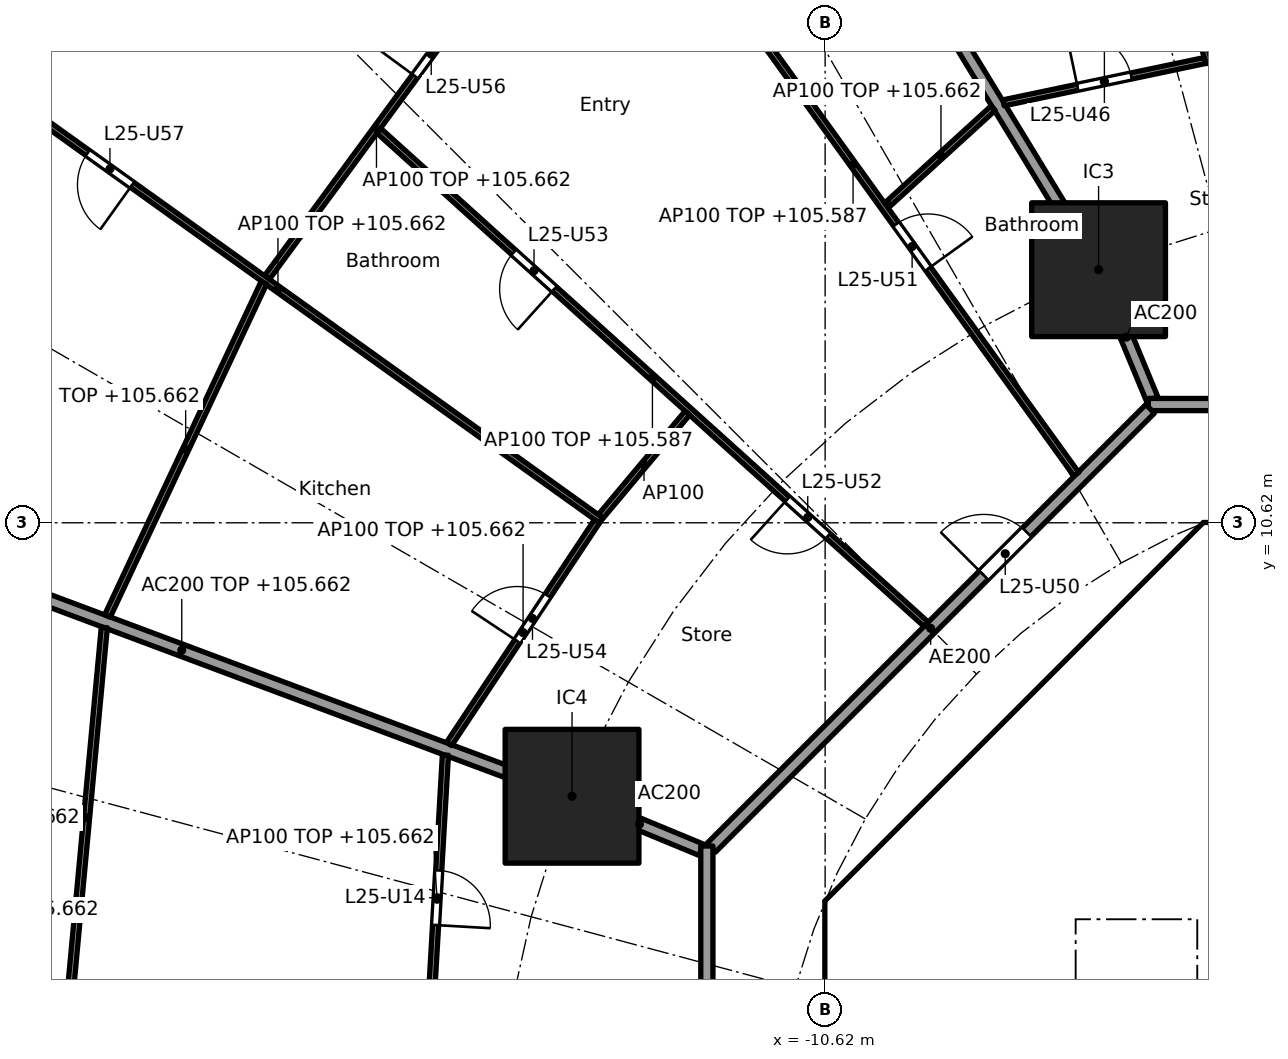
"""IFC4 building model, lengths in metres.
Left out: names, types, materials, properties, quantities, classifications, styles, units other than length and angle.
Written with IfcOpenShell. Run it as: python <this file> out.ifc"""

import sys

from ifc_helpers import new_model, si_unit, direction, frame, frame_2d, origin, origin_2d, place, context, subcontext, project, spatial, polyline, rectangle, outline, extrude, element, fill, save


model = new_model("IFC4")
c1 = context("Model", 3, precision=1e-05, world=origin(), true_north=direction((0.0, 1.0)))
c2 = subcontext(c1, "Body", "Model", "MODEL_VIEW")
j1 = project(units=[si_unit("LENGTHUNIT", "METRE"), si_unit("PLANEANGLEUNIT", "RADIAN")], contexts=[c1])
p1 = place(None, origin())
s1 = spatial("IfcSite", under=j1, at=p1, CompositionType="ELEMENT")
p2 = place(p1, origin())
s2 = spatial("IfcBuilding", under=s1, at=p2, CompositionType="ELEMENT")
p3 = place(p2, frame((0.0, 0.0, 102.9)))
s3 = spatial("IfcBuildingStorey", under=s2, at=p3, CompositionType="ELEMENT", Elevation=102.9)
for number, where, z_axis, x_axis in (
    (1, (-6.123, 14.782, 0.0), (0.0, 0.0, 1.0), (1.0, 0.0, 0.0)),
    (2, (-14.782, 6.123, 0.0), (0.0, 0.0, 1.0), (1.0, 0.0, 0.0)),
):
    element("IfcColumn", number, at=place(p3, frame(where, z_axis=z_axis, x_axis=x_axis)), inside=s3, PredefinedType="COLUMN", context=c2, shape_type="SweptSolid", body=[
        extrude(rectangle(XDim=2.2, YDim=2.2, at=origin_2d()), origin(), (0.0, 0.0, 1.0), 3.7),
    ])
p4 = place(p3, frame((-4.613, 9.988, 0.0), z_axis=(0.0, 0.0, 1.0), x_axis=(-0.707106781187, -0.707106781187, 0.0)))
e3 = element("IfcWall", 3, at=p4, inside=s3, PredefinedType="SHEAR", context=c2, shape_type="SweptSolid", body=[
    extrude(rectangle(XDim=7.602, YDim=0.6, at=frame_2d((3.801, 0.0))), origin(), (0.0, 0.0, 1.0), 3.44),
])
p5 = place(p4, frame((0.351, 0.0, 0.0)))
e4 = element("IfcOpeningElement", 4, at=p5, cuts=e3, PredefinedType="OPENING", context=c2, shape_type="SweptSolid", body=[
    extrude(rectangle(XDim=1.1, YDim=2.1, at=frame_2d((0.55, 1.05))), frame((0.0, 0.31, 0.0), z_axis=(0.0, -1.0, 0.0), x_axis=(1.0, 0.0, 0.0)), (0.0, 0.0, 1.0), 0.62),
])
p6 = place(p3, frame((-10.325, 3.801, 0.0), z_axis=(0.0, 0.0, 1.0), x_axis=(0.0, -1.0, 0.0)))
e5 = element("IfcWall", 5, at=p6, inside=s3, PredefinedType="SHEAR", context=c2, shape_type="SweptSolid", body=[
    extrude(rectangle(XDim=7.602, YDim=0.6, at=frame_2d((3.801, 0.0))), origin(), (0.0, 0.0, 1.0), 3.44),
])
p7 = place(p6, frame((0.651, 0.0, 0.0)))
e6 = element("IfcOpeningElement", 6, at=p7, cuts=e5, PredefinedType="OPENING", context=c2, shape_type="SweptSolid", body=[
    extrude(rectangle(XDim=1.5, YDim=2.1, at=frame_2d((0.75, 1.05))), frame((0.0, 0.31, 0.0), z_axis=(0.0, -1.0, 0.0), x_axis=(1.0, 0.0, 0.0)), (0.0, 0.0, 1.0), 0.62),
])
p8 = place(p6, frame((5.451, 0.0, 0.0)))
e7 = element("IfcOpeningElement", 7, at=p8, cuts=e5, PredefinedType="OPENING", context=c2, shape_type="SweptSolid", body=[
    extrude(rectangle(XDim=1.5, YDim=2.1, at=frame_2d((0.75, 1.05))), frame((0.0, 0.31, 0.0), z_axis=(0.0, -1.0, 0.0), x_axis=(1.0, 0.0, 0.0)), (0.0, 0.0, 1.0), 0.62),
])
p9 = place(p3, frame((-5.8, 4.3, 0.0), z_axis=(0.0, 0.0, 1.0), x_axis=(0.0, 1.0, 0.0)))
e8 = element("IfcWall", 8, at=p9, inside=s3, PredefinedType="PARTITIONING", context=c2, shape_type="SweptSolid", body=[
    extrude(rectangle(XDim=3.927, YDim=0.15, at=frame_2d((1.963, 0.0))), origin(), (0.0, 0.0, 1.0), 3.44),
])
p10 = place(p9, frame((0.413, 0.0, 0.0)))
e9 = element("IfcOpeningElement", 9, at=p10, cuts=e8, PredefinedType="OPENING", context=c2, shape_type="SweptSolid", body=[
    extrude(rectangle(XDim=0.9, YDim=2.1, at=frame_2d((0.45, 1.05))), frame((0.0, 0.085, 0.0), z_axis=(0.0, -1.0, 0.0), x_axis=(1.0, 0.0, 0.0)), (0.0, 0.0, 1.0), 0.17),
])
p11 = place(p9, frame((2.489, 0.0, 0.0)))
e10 = element("IfcOpeningElement", 10, at=p11, cuts=e8, PredefinedType="OPENING", context=c2, shape_type="SweptSolid", body=[
    extrude(rectangle(XDim=0.9, YDim=2.1, at=frame_2d((0.45, 1.05))), frame((0.0, 0.085, 0.0), z_axis=(0.0, -1.0, 0.0), x_axis=(1.0, 0.0, 0.0)), (0.0, 0.0, 1.0), 0.17),
])
p12 = place(p3, origin())
e11 = element("IfcWall", 11, at=p12, inside=s3, PredefinedType="SHEAR", context=c2, shape_type="SweptSolid", body=[
    extrude(outline(polyline([(-10.2, 4.825), (-9.776, 4.401), (-10.025, 4.152), (-10.025, 3.801), (-10.625, 3.801), (-10.625, 4.401), (-10.2, 4.825)])), origin(), (0.0, 0.0, 1.0), 3.44),
])
p13 = place(p3, origin())
e12 = element("IfcWall", 12, at=p13, inside=s3, PredefinedType="SHEAR", context=c2, shape_type="SweptSolid", body=[
    extrude(outline(polyline([(-4.152, 10.025), (-4.401, 9.776), (-4.825, 10.2), (-4.401, 10.625), (4.401, 10.625), (4.825, 10.2), (4.401, 9.776), (4.152, 10.025), (-4.152, 10.025)])), origin(), (0.0, 0.0, 1.0), 3.44),
])
p14 = place(p3, frame((-10.025, 4.0, 0.0), z_axis=(0.0, 0.0, 1.0), x_axis=(1.0, 0.0, 0.0)))
e13 = element("IfcWall", 13, at=p14, inside=s3, PredefinedType="PARTITIONING", context=c2, shape_type="SweptSolid", body=[
    extrude(rectangle(XDim=3.325, YDim=0.2, at=frame_2d((1.662, 0.0))), origin(), (0.0, 0.0, 1.0), 3.44),
])
p15 = place(p3, frame((-8.001, 6.1, 0.0), z_axis=(0.0, 0.0, 1.0), x_axis=(1.0, 0.0, 0.0)))
e14 = element("IfcWall", 14, at=p15, inside=s3, PredefinedType="PARTITIONING", context=c2, shape_type="SweptSolid", body=[
    extrude(rectangle(XDim=2.126, YDim=0.15, at=frame_2d((1.063, 0.0))), origin(), (0.0, 0.0, 1.0), 3.44),
])
p16 = place(p3, origin())
e15 = element("IfcWall", 15, at=p16, inside=s3, PredefinedType="SOLIDWALL", context=c2, shape_type="SweptSolid", body=[
    extrude(outline(polyline([(-6.5, 2.1), (-6.7, 2.1), (-6.7, 4.3), (6.7, 4.3), (6.7, 2.1), (6.5, 2.1), (6.5, 4.1), (4.5, 4.1), (4.5, 2.1), (4.3, 2.1), (4.3, 4.1), (2.3, 4.1), (2.3, 2.1), (2.1, 2.1), (2.1, 4.1), (0.1, 4.1), (0.1, 2.1), (-0.1, 2.1), (-0.1, 4.1), (-2.1, 4.1), (-2.1, 2.1), (-2.3, 2.1), (-2.3, 4.1), (-4.3, 4.1), (-4.3, 2.1), (-4.5, 2.1), (-4.5, 4.1), (-6.5, 4.1), (-6.5, 2.1)])), origin(), (0.0, 0.0, 1.0), 3.44),
])
p17 = place(p3, frame((-5.243, 12.657, 0.0), z_axis=(0.0, 0.0, 1.0), x_axis=(-0.38273085373, 0.923859888513, 0.0)))
e16 = element("IfcWall", 16, at=p17, inside=s3, PredefinedType="PARTITIONING", context=c2, shape_type="SweptSolid", body=[
    extrude(rectangle(XDim=2.199, YDim=0.2, at=frame_2d((1.1, 0.0))), origin(), (0.0, 0.0, 1.0), 3.44),
])
p18 = place(p3, frame((-6.149, 14.825, 0.0), z_axis=(0.0, 0.0, 1.0), x_axis=(-0.520412862249, 0.853914780763, 0.0)))
e17 = element("IfcWall", 17, at=p18, inside=s3, PredefinedType="PARTITIONING", context=c2, shape_type="SweptSolid", body=[
    extrude(rectangle(XDim=17.202, YDim=0.2, at=frame_2d((8.601, 0.0))), origin(), (0.0, 0.0, 1.0), 2.762),
])
p19 = place(p3, frame((-12.657, 5.243, 0.0), z_axis=(0.0, 0.0, 1.0), x_axis=(-0.923843626288, 0.382770106157, 0.0)))
e18 = element("IfcWall", 18, at=p19, inside=s3, PredefinedType="PARTITIONING", context=c2, shape_type="SweptSolid", body=[
    extrude(rectangle(XDim=2.199, YDim=0.2, at=frame_2d((1.1, 0.0))), origin(), (0.0, 0.0, 1.0), 3.44),
])
p20 = place(p3, frame((-14.829, 6.14, 0.0), z_axis=(0.0, 0.0, 1.0), x_axis=(-0.936597324342, 0.35040755134, 0.0)))
e19 = element("IfcWall", 19, at=p20, inside=s3, PredefinedType="PARTITIONING", context=c2, shape_type="SweptSolid", body=[
    extrude(rectangle(XDim=13.606, YDim=0.2, at=frame_2d((6.803, 0.0))), origin(), (0.0, 0.0, 1.0), 2.762),
])
p21 = place(p3, frame((5.104, 12.565, 0.0), z_axis=(0.0, 0.0, 1.0), x_axis=(-1.0, 0.0, 0.0)))
e20 = element("IfcWall", 20, at=p21, inside=s3, PredefinedType="PARTITIONING", context=c2, shape_type="SweptSolid", body=[
    extrude(rectangle(XDim=10.409, YDim=0.2, at=frame_2d((5.205, 0.0))), origin(), (0.0, 0.0, 1.0), 3.44),
])
p22 = place(p21, frame((4.604, 0.0, 0.0)))
e21 = element("IfcOpeningElement", 21, at=p22, cuts=e20, PredefinedType="OPENING", context=c2, shape_type="SweptSolid", body=[
    extrude(rectangle(XDim=1.0, YDim=2.1, at=frame_2d((0.5, 1.05))), frame((0.0, 0.11, 0.0), z_axis=(0.0, -1.0, 0.0), x_axis=(1.0, 0.0, 0.0)), (0.0, 0.0, 1.0), 0.22),
])
p23 = place(p3, frame((-5.275, 12.494, 0.0), z_axis=(0.0, 0.0, 1.0), x_axis=(-0.707106781187, -0.707106781187, 0.0)))
e22 = element("IfcWall", 22, at=p23, inside=s3, PredefinedType="PARTITIONING", context=c2, shape_type="SweptSolid", body=[
    extrude(rectangle(XDim=10.209, YDim=0.2, at=frame_2d((5.104, 0.0))), origin(), (0.0, 0.0, 1.0), 3.44),
])
p24 = place(p23, frame((2.87, 0.0, 0.0)))
e23 = element("IfcOpeningElement", 23, at=p24, cuts=e22, PredefinedType="OPENING", context=c2, shape_type="SweptSolid", body=[
    extrude(rectangle(XDim=1.0, YDim=2.1, at=frame_2d((0.5, 1.05))), frame((0.0, 0.11, 0.0), z_axis=(0.0, -1.0, 0.0), x_axis=(1.0, 0.0, 0.0)), (0.0, 0.0, 1.0), 0.22),
])
p25 = place(p3, frame((-12.565, 5.304, 0.0), z_axis=(0.0, 0.0, 1.0), x_axis=(0.0, -1.0, 0.0)))
e24 = element("IfcWall", 24, at=p25, inside=s3, PredefinedType="PARTITIONING", context=c2, shape_type="SweptSolid", body=[
    extrude(rectangle(XDim=10.409, YDim=0.2, at=frame_2d((5.205, 0.0))), origin(), (0.0, 0.0, 1.0), 3.44),
])
p26 = place(p3, frame((-4.306, 18.185, 0.0), z_axis=(0.0, 0.0, 1.0), x_axis=(-0.290183838394, 0.956970919064, 0.0)))
e25 = element("IfcWall", 25, at=p26, inside=s3, PredefinedType="PARTITIONING", context=c2, shape_type="SweptSolid", body=[
    extrude(rectangle(XDim=15.015, YDim=0.1, at=frame_2d((7.508, 0.0))), origin(), (0.0, 0.0, 1.0), 2.762),
])
p27 = place(p26, frame((10.922, 0.0, 0.0)))
e26 = element("IfcOpeningElement", 26, at=p27, cuts=e25, PredefinedType="OPENING", context=c2, shape_type="SweptSolid", body=[
    extrude(rectangle(XDim=0.9, YDim=2.1, at=frame_2d((0.45, 1.05))), frame((0.0, 0.06, 0.0), z_axis=(0.0, -1.0, 0.0), x_axis=(1.0, 0.0, 0.0)), (0.0, 0.0, 1.0), 0.12),
])
p28 = place(p3, frame((-4.37, 18.223, 0.0), z_axis=(0.0, 0.0, 1.0), x_axis=(-0.978633053291, -0.205614559323, 0.0)))
e27 = element("IfcWall", 27, at=p28, inside=s3, PredefinedType="PARTITIONING", context=c2, shape_type="SweptSolid", body=[
    extrude(rectangle(XDim=3.387, YDim=0.1, at=frame_2d((1.694, 0.0))), origin(), (0.0, 0.0, 1.0), 2.762),
])
p29 = place(p28, frame((1.244, 0.0, 0.0)))
e28 = element("IfcOpeningElement", 28, at=p29, cuts=e27, PredefinedType="OPENING", context=c2, shape_type="SweptSolid", body=[
    extrude(rectangle(XDim=0.9, YDim=2.1, at=frame_2d((0.45, 1.05))), frame((0.0, 0.06, 0.0), z_axis=(0.0, -1.0, 0.0), x_axis=(1.0, 0.0, 0.0)), (0.0, 0.0, 1.0), 0.12),
])
p30 = place(p3, frame((-7.857, 17.438, 0.0), z_axis=(0.0, 0.0, 1.0), x_axis=(-0.738883513135, -0.673833179665, 0.0)))
e29 = element("IfcWall", 29, at=p30, inside=s3, PredefinedType="PARTITIONING", context=c2, shape_type="SweptSolid", body=[
    extrude(rectangle(XDim=2.323, YDim=0.1, at=frame_2d((1.162, 0.0))), origin(), (0.0, 0.0, 1.0), 2.762),
])
p31 = place(p3, frame((-6.49, 11.419, 0.0), z_axis=(0.0, 0.0, 1.0), x_axis=(-0.584832823883, 0.811153849839, 0.0)))
e30 = element("IfcWall", 30, at=p31, inside=s3, PredefinedType="PARTITIONING", context=c2, shape_type="SweptSolid", body=[
    extrude(rectangle(XDim=12.553, YDim=0.1, at=frame_2d((6.277, 0.0))), origin(), (0.0, 0.0, 1.0), 2.687),
])
p32 = place(p31, frame((4.166, 0.0, 0.0)))
e31 = element("IfcOpeningElement", 31, at=p32, cuts=e30, PredefinedType="OPENING", context=c2, shape_type="SweptSolid", body=[
    extrude(rectangle(XDim=0.9, YDim=2.1, at=frame_2d((0.45, 1.05))), frame((0.0, 0.06, 0.0), z_axis=(0.0, -1.0, 0.0), x_axis=(1.0, 0.0, 0.0)), (0.0, 0.0, 1.0), 0.12),
])
p33 = place(p3, frame((-16.197, 19.551, 0.0), z_axis=(0.0, 0.0, 1.0), x_axis=(-0.592391983588, -0.80564988536, 0.0)))
e32 = element("IfcWall", 32, at=p33, inside=s3, PredefinedType="PARTITIONING", context=c2, shape_type="SweptSolid", body=[
    extrude(rectangle(XDim=6.08, YDim=0.1, at=frame_2d((3.04, 0.0))), origin(), (0.0, 0.0, 1.0), 2.762),
])
p34 = place(p33, frame((1.07, 0.0, 0.0)))
e33 = element("IfcOpeningElement", 33, at=p34, cuts=e32, PredefinedType="OPENING", context=c2, shape_type="SweptSolid", body=[
    extrude(rectangle(XDim=0.9, YDim=2.1, at=frame_2d((0.45, 1.05))), frame((0.0, 0.06, 0.0), z_axis=(0.0, -1.0, 0.0), x_axis=(1.0, 0.0, 0.0)), (0.0, 0.0, 1.0), 0.12),
])
p35 = place(p3, frame((-8.959, 8.952, 0.0), z_axis=(0.0, 0.0, 1.0), x_axis=(-0.742679904999, 0.669646592398, 0.0)))
e34 = element("IfcWall", 34, at=p35, inside=s3, PredefinedType="PARTITIONING", context=c2, shape_type="SweptSolid", body=[
    extrude(rectangle(XDim=12.121, YDim=0.1, at=frame_2d((6.061, 0.0))), origin(), (0.0, 0.0, 1.0), 2.687),
])
p36 = place(p35, frame((2.172, 0.0, 0.0)))
e35 = element("IfcOpeningElement", 35, at=p36, cuts=e34, PredefinedType="OPENING", context=c2, shape_type="SweptSolid", body=[
    extrude(rectangle(XDim=0.9, YDim=2.1, at=frame_2d((0.45, 1.05))), frame((0.0, 0.06, 0.0), z_axis=(0.0, -1.0, 0.0), x_axis=(1.0, 0.0, 0.0)), (0.0, 0.0, 1.0), 0.12),
])
p37 = place(p35, frame((8.233, 0.0, 0.0)))
e36 = element("IfcOpeningElement", 36, at=p37, cuts=e34, PredefinedType="OPENING", context=c2, shape_type="SweptSolid", body=[
    extrude(rectangle(XDim=0.9, YDim=2.1, at=frame_2d((0.45, 1.05))), frame((0.0, 0.06, 0.0), z_axis=(0.0, -1.0, 0.0), x_axis=(1.0, 0.0, 0.0)), (0.0, 0.0, 1.0), 0.12),
])
p38 = place(p3, frame((-12.885, 12.425, 0.0), z_axis=(0.0, 0.0, 1.0), x_axis=(-0.642551826067, -0.766242227248, 0.0)))
e37 = element("IfcWall", 37, at=p38, inside=s3, PredefinedType="PARTITIONING", context=c2, shape_type="SweptSolid", body=[
    extrude(rectangle(XDim=2.219, YDim=0.1, at=frame_2d((1.109, 0.0))), origin(), (0.0, 0.0, 1.0), 3.44),
])
p39 = place(p3, frame((-14.302, 10.657, 0.0), z_axis=(0.0, 0.0, 1.0), x_axis=(-0.813183002698, 0.582008079087, 0.0)))
e38 = element("IfcWall", 38, at=p39, inside=s3, PredefinedType="PARTITIONING", context=c2, shape_type="SweptSolid", body=[
    extrude(rectangle(XDim=13.074, YDim=0.1, at=frame_2d((6.537, 0.0))), origin(), (0.0, 0.0, 1.0), 2.762),
])
p40 = place(p39, frame((9.485, 0.0, 0.0)))
e39 = element("IfcOpeningElement", 39, at=p40, cuts=e38, PredefinedType="OPENING", context=c2, shape_type="SweptSolid", body=[
    extrude(rectangle(XDim=0.9, YDim=2.1, at=frame_2d((0.45, 1.05))), frame((0.0, 0.06, 0.0), z_axis=(0.0, -1.0, 0.0), x_axis=(1.0, 0.0, 0.0)), (0.0, 0.0, 1.0), 0.12),
])
p41 = place(p3, frame((-14.371, 10.645, 0.0), z_axis=(0.0, 0.0, 1.0), x_axis=(-0.553341009285, -0.832954817168, 0.0)))
e40 = element("IfcWall", 40, at=p41, inside=s3, PredefinedType="PARTITIONING", context=c2, shape_type="SweptSolid", body=[
    extrude(rectangle(XDim=4.396, YDim=0.1, at=frame_2d((2.198, 0.0))), origin(), (0.0, 0.0, 1.0), 2.762),
])
p42 = place(p41, frame((1.469, 0.0, 0.0)))
e41 = element("IfcOpeningElement", 41, at=p42, cuts=e40, PredefinedType="OPENING", context=c2, shape_type="SweptSolid", body=[
    extrude(rectangle(XDim=0.9, YDim=2.1, at=frame_2d((0.45, 1.05))), frame((0.0, 0.06, 0.0), z_axis=(0.0, -1.0, 0.0), x_axis=(1.0, 0.0, 0.0)), (0.0, 0.0, 1.0), 0.12),
])
p43 = place(p3, frame((-19.85, 14.567, 0.0), z_axis=(0.0, 0.0, 1.0), x_axis=(-0.424942210745, -0.905220480064, 0.0)))
e42 = element("IfcWall", 42, at=p43, inside=s3, PredefinedType="PARTITIONING", context=c2, shape_type="SweptSolid", body=[
    extrude(rectangle(XDim=6.053, YDim=0.1, at=frame_2d((3.027, 0.0))), origin(), (0.0, 0.0, 1.0), 2.762),
])
p44 = place(p3, frame((-16.865, 6.8, 0.0), z_axis=(0.0, 0.0, 1.0), x_axis=(-0.05777584434, -0.998329580755, 0.0)))
e43 = element("IfcWall", 43, at=p44, inside=s3, PredefinedType="PARTITIONING", context=c2, shape_type="SweptSolid", body=[
    extrude(rectangle(XDim=4.75, YDim=0.1, at=frame_2d((2.375, 0.0))), origin(), (0.0, 0.0, 1.0), 2.762),
])
p45 = place(p44, frame((1.9, 0.0, 0.0)))
e44 = element("IfcOpeningElement", 44, at=p45, cuts=e43, PredefinedType="OPENING", context=c2, shape_type="SweptSolid", body=[
    extrude(rectangle(XDim=0.9, YDim=2.1, at=frame_2d((0.45, 1.05))), frame((0.0, 0.06, 0.0), z_axis=(0.0, -1.0, 0.0), x_axis=(1.0, 0.0, 0.0)), (0.0, 0.0, 1.0), 0.12),
])
p46 = place(p3, frame((-22.474, 8.898, 0.0), z_axis=(0.0, 0.0, 1.0), x_axis=(-0.092756864489, -0.995688788774, 0.0)))
e45 = element("IfcWall", 45, at=p46, inside=s3, PredefinedType="PARTITIONING", context=c2, shape_type="SweptSolid", body=[
    extrude(rectangle(XDim=6.283, YDim=0.1, at=frame_2d((3.141, 0.0))), origin(), (0.0, 0.0, 1.0), 2.762),
])
p47 = place(p10, origin())
e46 = element("IfcDoor", 46, at=p47, inside=s3, OperationType="SINGLE_SWING_RIGHT", PredefinedType="DOOR", context=c2, shape_type="SweptSolid", body=[
    extrude(rectangle(XDim=0.9, YDim=2.1, at=frame_2d((0.45, 1.05))), frame((0.0, 0.025, 0.0), z_axis=(0.0, -1.0, 0.0), x_axis=(1.0, 0.0, 0.0)), (0.0, 0.0, 1.0), 0.05),
])
fill(e9, e46)
p48 = place(p11, origin())
e47 = element("IfcDoor", 47, at=p48, inside=s3, OperationType="SINGLE_SWING_RIGHT", PredefinedType="DOOR", context=c2, shape_type="SweptSolid", body=[
    extrude(rectangle(XDim=0.9, YDim=2.1, at=frame_2d((0.45, 1.05))), frame((0.0, 0.025, 0.0), z_axis=(0.0, -1.0, 0.0), x_axis=(1.0, 0.0, 0.0)), (0.0, 0.0, 1.0), 0.05),
])
fill(e10, e47)
p49 = place(p7, origin())
e48 = element("IfcDoor", 48, at=p49, inside=s3, OperationType="DOUBLE_DOOR_SINGLE_SWING", PredefinedType="DOOR", context=c2, shape_type="SweptSolid", body=[
    extrude(rectangle(XDim=1.5, YDim=2.1, at=frame_2d((0.75, 1.05))), frame((0.0, 0.025, 0.0), z_axis=(0.0, -1.0, 0.0), x_axis=(1.0, 0.0, 0.0)), (0.0, 0.0, 1.0), 0.05),
])
fill(e6, e48)
p50 = place(p5, origin())
e49 = element("IfcDoor", 49, at=p50, inside=s3, OperationType="SINGLE_SWING_LEFT", PredefinedType="DOOR", context=c2, shape_type="SweptSolid", body=[
    extrude(rectangle(XDim=1.1, YDim=2.1, at=frame_2d((0.55, 1.05))), frame((0.0, 0.025, 0.0), z_axis=(0.0, -1.0, 0.0), x_axis=(1.0, 0.0, 0.0)), (0.0, 0.0, 1.0), 0.05),
])
fill(e4, e49)
p51 = place(p45, origin())
e50 = element("IfcDoor", 50, at=p51, inside=s3, OperationType="SINGLE_SWING_RIGHT", PredefinedType="DOOR", context=c2, shape_type="SweptSolid", body=[
    extrude(rectangle(XDim=0.9, YDim=2.1, at=frame_2d((0.45, 1.05))), frame((0.0, 0.025, 0.0), z_axis=(0.0, -1.0, 0.0), x_axis=(1.0, 0.0, 0.0)), (0.0, 0.0, 1.0), 0.05),
])
fill(e44, e50)
p52 = place(p29, frame((0.9, 0.0, 0.0), x_axis=(-1.0, 0.0, 0.0)))
e51 = element("IfcDoor", 51, at=p52, inside=s3, OperationType="SINGLE_SWING_LEFT", PredefinedType="DOOR", context=c2, shape_type="SweptSolid", body=[
    extrude(rectangle(XDim=0.9, YDim=2.1, at=frame_2d((0.45, 1.05))), frame((0.0, 0.025, 0.0), z_axis=(0.0, -1.0, 0.0), x_axis=(1.0, 0.0, 0.0)), (0.0, 0.0, 1.0), 0.05),
])
fill(e28, e51)
p53 = place(p24, frame((1.0, 0.0, 0.0), x_axis=(-1.0, 0.0, 0.0)))
e52 = element("IfcDoor", 52, at=p53, inside=s3, OperationType="SINGLE_SWING_LEFT", PredefinedType="DOOR", context=c2, shape_type="SweptSolid", body=[
    extrude(rectangle(XDim=1.0, YDim=2.1, at=frame_2d((0.5, 1.05))), frame((0.0, 0.025, 0.0), z_axis=(0.0, -1.0, 0.0), x_axis=(1.0, 0.0, 0.0)), (0.0, 0.0, 1.0), 0.05),
])
fill(e23, e52)
p54 = place(p32, frame((0.9, 0.0, 0.0), x_axis=(-1.0, 0.0, 0.0)))
e53 = element("IfcDoor", 53, at=p54, inside=s3, OperationType="SINGLE_SWING_RIGHT", PredefinedType="DOOR", context=c2, shape_type="SweptSolid", body=[
    extrude(rectangle(XDim=0.9, YDim=2.1, at=frame_2d((0.45, 1.05))), frame((0.0, 0.025, 0.0), z_axis=(0.0, -1.0, 0.0), x_axis=(1.0, 0.0, 0.0)), (0.0, 0.0, 1.0), 0.05),
])
fill(e31, e53)
p55 = place(p36, origin())
e54 = element("IfcDoor", 54, at=p55, inside=s3, OperationType="SINGLE_SWING_RIGHT", PredefinedType="DOOR", context=c2, shape_type="SweptSolid", body=[
    extrude(rectangle(XDim=0.9, YDim=2.1, at=frame_2d((0.45, 1.05))), frame((0.0, 0.025, 0.0), z_axis=(0.0, -1.0, 0.0), x_axis=(1.0, 0.0, 0.0)), (0.0, 0.0, 1.0), 0.05),
])
fill(e35, e54)
p56 = place(p37, origin())
e55 = element("IfcDoor", 55, at=p56, inside=s3, OperationType="SINGLE_SWING_LEFT", PredefinedType="DOOR", context=c2, shape_type="SweptSolid", body=[
    extrude(rectangle(XDim=0.9, YDim=2.1, at=frame_2d((0.45, 1.05))), frame((0.0, 0.025, 0.0), z_axis=(0.0, -1.0, 0.0), x_axis=(1.0, 0.0, 0.0)), (0.0, 0.0, 1.0), 0.05),
])
fill(e36, e55)
p57 = place(p42, frame((0.9, 0.0, 0.0), x_axis=(-1.0, 0.0, 0.0)))
e56 = element("IfcDoor", 56, at=p57, inside=s3, OperationType="SINGLE_SWING_LEFT", PredefinedType="DOOR", context=c2, shape_type="SweptSolid", body=[
    extrude(rectangle(XDim=0.9, YDim=2.1, at=frame_2d((0.45, 1.05))), frame((0.0, 0.025, 0.0), z_axis=(0.0, -1.0, 0.0), x_axis=(1.0, 0.0, 0.0)), (0.0, 0.0, 1.0), 0.05),
])
fill(e41, e56)
p58 = place(p34, frame((0.9, 0.0, 0.0), x_axis=(-1.0, 0.0, 0.0)))
e57 = element("IfcDoor", 57, at=p58, inside=s3, OperationType="SINGLE_SWING_LEFT", PredefinedType="DOOR", context=c2, shape_type="SweptSolid", body=[
    extrude(rectangle(XDim=0.9, YDim=2.1, at=frame_2d((0.45, 1.05))), frame((0.0, 0.025, 0.0), z_axis=(0.0, -1.0, 0.0), x_axis=(1.0, 0.0, 0.0)), (0.0, 0.0, 1.0), 0.05),
])
fill(e33, e57)
p59 = place(p40, origin())
e58 = element("IfcDoor", 58, at=p59, inside=s3, OperationType="SINGLE_SWING_LEFT", PredefinedType="DOOR", context=c2, shape_type="SweptSolid", body=[
    extrude(rectangle(XDim=0.9, YDim=2.1, at=frame_2d((0.45, 1.05))), frame((0.0, 0.025, 0.0), z_axis=(0.0, -1.0, 0.0), x_axis=(1.0, 0.0, 0.0)), (0.0, 0.0, 1.0), 0.05),
])
fill(e39, e58)
save(model, sys.argv[1])
